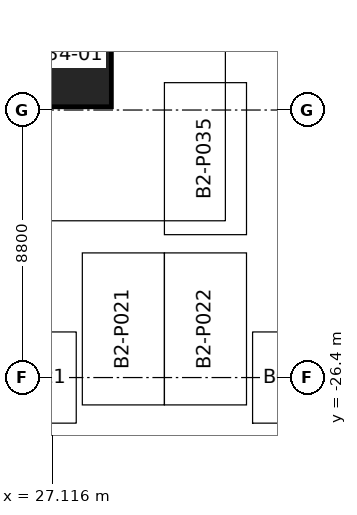
"""IFC4 building model, lengths in metres.
Left out: names, types, materials, properties, quantities, classifications, styles, units other than length and angle.
Written with IfcOpenShell. Run it as: python <this file> out.ifc"""

import sys

from ifc_helpers import new_model, si_unit, direction, frame, origin, origin_2d, place, context, subcontext, project, spatial, rectangle, extrude, element, save


model = new_model("IFC4")
c1 = context("Model", 3, precision=1e-05, world=origin(), true_north=direction((0.0, 1.0)))
c2 = subcontext(c1, "Body", "Model", "MODEL_VIEW")
j1 = project(units=[si_unit("LENGTHUNIT", "METRE"), si_unit("PLANEANGLEUNIT", "RADIAN")], contexts=[c1])
p1 = place(None, origin())
s1 = spatial("IfcSite", under=j1, at=p1, CompositionType="ELEMENT")
p2 = place(p1, origin())
s2 = spatial("IfcBuilding", under=s1, at=p2, CompositionType="ELEMENT")
p3 = place(p2, frame((0.0, 0.0, -9.0)))
s3 = spatial("IfcBuildingStorey", under=s2, at=p3, CompositionType="ELEMENT", Elevation=-9.0)
p4 = place(p3, frame((27.355, -15.793, 0.0), z_axis=(0.0, 0.0, 1.0), x_axis=(1.0, 0.0, 0.0)))
e1 = element("IfcColumn", 1, at=p4, inside=s3, PredefinedType="COLUMN", context=c2, shape_type="SweptSolid", body=[
    extrude(rectangle(XDim=3.4, YDim=3.4, at=origin_2d()), origin(), (0.0, 0.0, 1.0), 4.5),
])
save(model, sys.argv[1])
